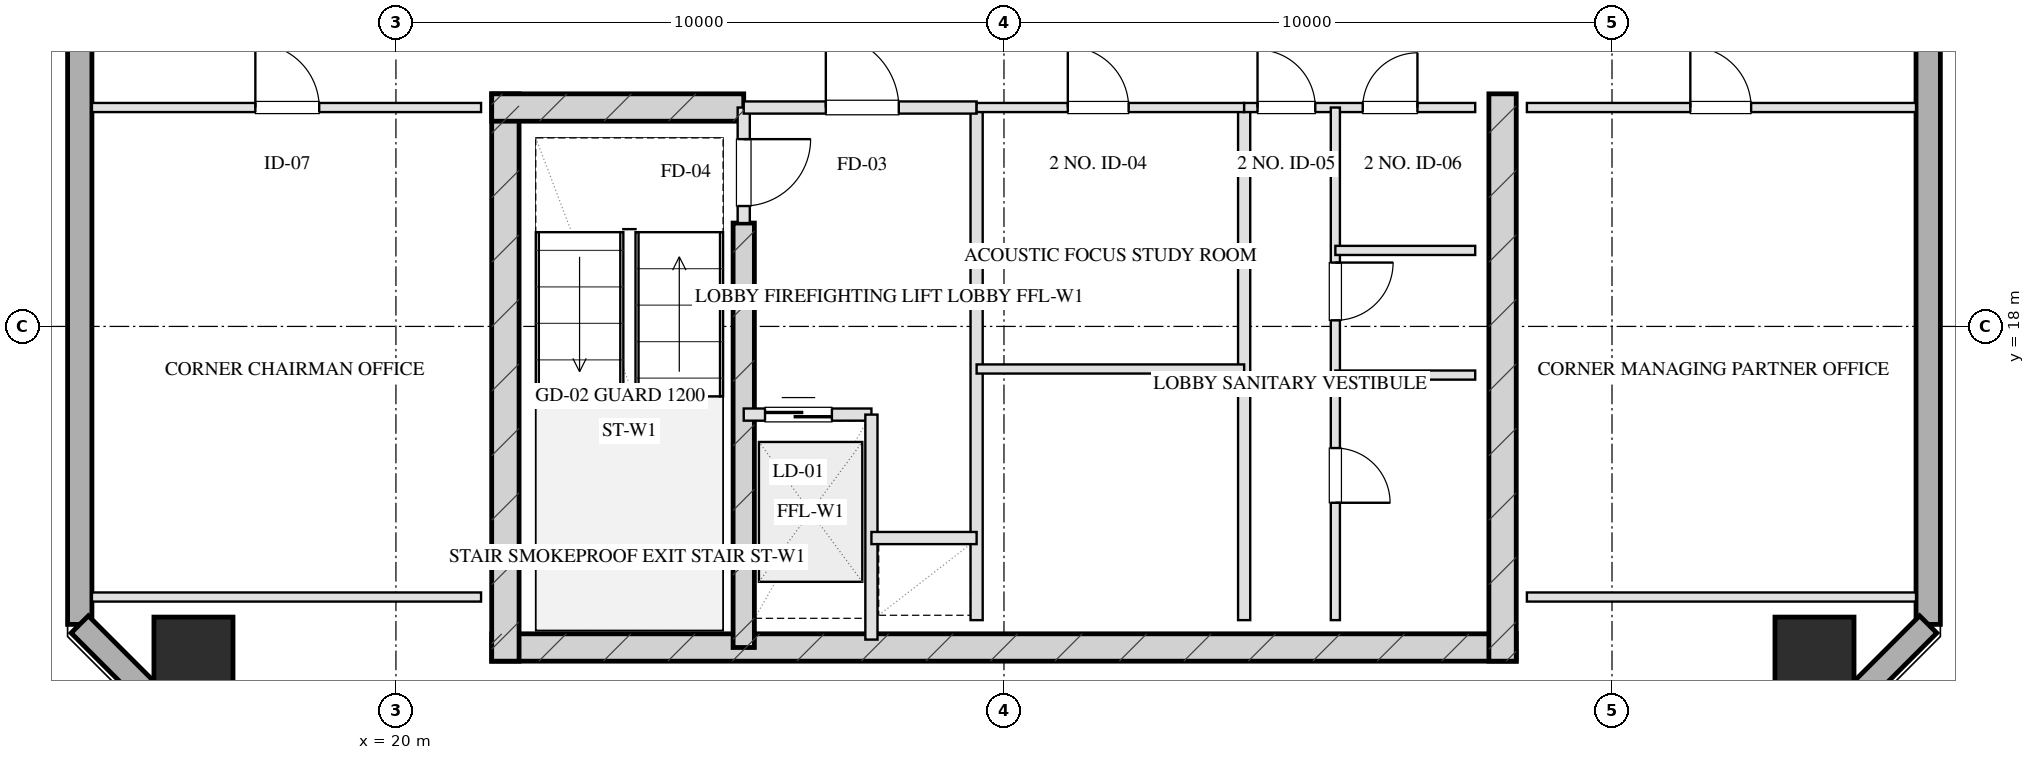
"""IFC4 building model, lengths in metres.
Left out: names, types, materials, properties, quantities, classifications, styles, units other than length and angle.
Written with IfcOpenShell. Run it as: python <this file> out.ifc"""

import sys

from ifc_helpers import new_model, si_unit, direction, frame, frame_2d, origin, origin_2d, place, context, subcontext, project, spatial, rectangle, hollow_rectangle, extrude, element, fill, save


model = new_model("IFC4")
c1 = context("Model", 3, precision=1e-05, world=origin(), true_north=direction((0.0, 1.0)))
c2 = subcontext(c1, "Body", "Model", "MODEL_VIEW")
j1 = project(units=[si_unit("LENGTHUNIT", "METRE"), si_unit("PLANEANGLEUNIT", "RADIAN")], contexts=[c1])
p1 = place(None, origin())
s1 = spatial("IfcSite", under=j1, at=p1, CompositionType="ELEMENT")
p2 = place(p1, origin())
s2 = spatial("IfcBuilding", under=s1, at=p2, CompositionType="ELEMENT")
p3 = place(p2, frame((0.0, 0.0, 253.6)))
s3 = spatial("IfcBuildingStorey", under=s2, at=p3, CompositionType="ELEMENT", Elevation=253.6)
p4 = place(p3, frame((21.575, 12.72, 0.0), z_axis=(0.0, 0.0, 1.0), x_axis=(1.0, 0.0, 0.0)))
e1 = element("IfcWall", 1, at=p4, inside=s3, PredefinedType="SHEAR", context=c2, shape_type="SweptSolid", body=[
    extrude(rectangle(XDim=16.85, YDim=0.45, at=frame_2d((8.425, 0.0))), origin(), (0.0, 0.0, 1.0), 3.2),
])
for number, where, z_axis, x_axis in (
    (2, (21.8, 21.825, 0.0), (0.0, 0.0, 1.0), (0.0, -1.0, 0.0)),
    (3, (38.2, 21.825, 0.0), (0.0, 0.0, 1.0), (0.0, -1.0, 0.0)),
):
    element("IfcWall", number, at=place(p3, frame(where, z_axis=z_axis, x_axis=x_axis)), inside=s3, PredefinedType="SHEAR", context=c2, shape_type="SweptSolid", body=[
        extrude(rectangle(XDim=9.33, YDim=0.45, at=frame_2d((4.665, 0.0))), origin(), (0.0, 0.0, 1.0), 3.2),
    ])
p5 = place(p3, frame((25.72, 19.7, 0.0), z_axis=(0.0, 0.0, 1.0), x_axis=(0.0, -1.0, 0.0)))
e4 = element("IfcWall", 4, at=p5, inside=s3, PredefinedType="SHEAR", context=c2, shape_type="SweptSolid", body=[
    extrude(rectangle(XDim=6.98, YDim=0.35, at=frame_2d((3.49, 0.0))), origin(), (0.0, 0.0, 1.0), 3.2),
])
p6 = place(p3, frame((21.575, 21.6, 0.0), z_axis=(0.0, 0.0, 1.0), x_axis=(1.0, 0.0, 0.0)))
e5 = element("IfcWall", 5, at=p6, inside=s3, PredefinedType="SHEAR", context=c2, shape_type="SweptSolid", body=[
    extrude(rectangle(XDim=4.145, YDim=0.45, at=frame_2d((2.073, 0.0))), origin(), (0.0, 0.0, 1.0), 3.2),
])
for number, where, z_axis, x_axis in (
    (6, (16.67, 12.57, 0.0), (0.0, 0.0, 1.0), (1.0, 0.0, 0.0)),
    (7, (43.33, 12.57, 0.0), (0.0, 0.0, 1.0), (1.0, 0.0, 0.0)),
):
    element("IfcColumn", number, at=place(p3, frame(where, z_axis=z_axis, x_axis=x_axis)), inside=s3, PredefinedType="COLUMN", context=c2, shape_type="SweptSolid", body=[
        extrude(hollow_rectangle(XDim=1.3, YDim=1.3, WallThickness=0.045, at=origin_2d()), origin(), (0.0, 0.0, 1.0), 3.201),
    ])
p7 = place(p3, frame((14.8, 13.1, 0.0), z_axis=(0.0, 0.0, 1.0), x_axis=(0.0, 1.0, 0.0)))
e8 = element("IfcWall", 8, at=p7, inside=s3, PredefinedType="SOLIDWALL", context=c2, shape_type="SweptSolid", body=[
    extrude(rectangle(XDim=41.8, YDim=0.4, at=frame_2d((20.9, 0.0))), origin(), (0.0, 0.0, 1.0), 2.36),
])
p8 = place(p7, frame((13.525, 0.0, 0.75)))
e9 = element("IfcOpeningElement", 9, at=p8, cuts=e8, PredefinedType="OPENING", context=c2, shape_type="SweptSolid", body=[
    extrude(rectangle(XDim=1.95, YDim=1.21, at=frame_2d((0.975, 0.605))), frame((0.0, 0.21, 0.0), z_axis=(0.0, -1.0, 0.0), x_axis=(1.0, 0.0, 0.0)), (0.0, 0.0, 1.0), 0.42),
])
p9 = place(p7, frame((17.325, 0.0, 0.75)))
e10 = element("IfcOpeningElement", 10, at=p9, cuts=e8, PredefinedType="OPENING", context=c2, shape_type="SweptSolid", body=[
    extrude(rectangle(XDim=1.95, YDim=1.21, at=frame_2d((0.975, 0.605))), frame((0.0, 0.21, 0.0), z_axis=(0.0, -1.0, 0.0), x_axis=(1.0, 0.0, 0.0)), (0.0, 0.0, 1.0), 0.42),
])
p10 = place(p7, frame((22.525, 0.0, 0.75)))
e11 = element("IfcOpeningElement", 11, at=p10, cuts=e8, PredefinedType="OPENING", context=c2, shape_type="SweptSolid", body=[
    extrude(rectangle(XDim=1.95, YDim=1.21, at=frame_2d((0.975, 0.605))), frame((0.0, 0.21, 0.0), z_axis=(0.0, -1.0, 0.0), x_axis=(1.0, 0.0, 0.0)), (0.0, 0.0, 1.0), 0.42),
])
p11 = place(p7, frame((26.325, 0.0, 0.75)))
e12 = element("IfcOpeningElement", 12, at=p11, cuts=e8, PredefinedType="OPENING", context=c2, shape_type="SweptSolid", body=[
    extrude(rectangle(XDim=1.95, YDim=1.21, at=frame_2d((0.975, 0.605))), frame((0.0, 0.21, 0.0), z_axis=(0.0, -1.0, 0.0), x_axis=(1.0, 0.0, 0.0)), (0.0, 0.0, 1.0), 0.42),
])
p12 = place(p3, frame((45.2, 54.9, 0.0), z_axis=(0.0, 0.0, 1.0), x_axis=(0.0, -1.0, 0.0)))
e13 = element("IfcWall", 13, at=p12, inside=s3, PredefinedType="SOLIDWALL", context=c2, shape_type="SweptSolid", body=[
    extrude(rectangle(XDim=41.8, YDim=0.4, at=frame_2d((20.9, 0.0))), origin(), (0.0, 0.0, 1.0), 2.36),
])
p13 = place(p12, frame((26.325, 0.0, 0.75)))
e14 = element("IfcOpeningElement", 14, at=p13, cuts=e13, PredefinedType="OPENING", context=c2, shape_type="SweptSolid", body=[
    extrude(rectangle(XDim=1.95, YDim=1.21, at=frame_2d((0.975, 0.605))), frame((0.0, 0.21, 0.0), z_axis=(0.0, -1.0, 0.0), x_axis=(1.0, 0.0, 0.0)), (0.0, 0.0, 1.0), 0.42),
])
p14 = place(p12, frame((22.525, 0.0, 0.75)))
e15 = element("IfcOpeningElement", 15, at=p14, cuts=e13, PredefinedType="OPENING", context=c2, shape_type="SweptSolid", body=[
    extrude(rectangle(XDim=1.95, YDim=1.21, at=frame_2d((0.975, 0.605))), frame((0.0, 0.21, 0.0), z_axis=(0.0, -1.0, 0.0), x_axis=(1.0, 0.0, 0.0)), (0.0, 0.0, 1.0), 0.42),
])
p15 = place(p12, frame((17.325, 0.0, 0.75)))
e16 = element("IfcOpeningElement", 16, at=p15, cuts=e13, PredefinedType="OPENING", context=c2, shape_type="SweptSolid", body=[
    extrude(rectangle(XDim=1.95, YDim=1.21, at=frame_2d((0.975, 0.605))), frame((0.0, 0.21, 0.0), z_axis=(0.0, -1.0, 0.0), x_axis=(1.0, 0.0, 0.0)), (0.0, 0.0, 1.0), 0.42),
])
p16 = place(p12, frame((13.525, 0.0, 0.75)))
e17 = element("IfcOpeningElement", 17, at=p16, cuts=e13, PredefinedType="OPENING", context=c2, shape_type="SweptSolid", body=[
    extrude(rectangle(XDim=1.95, YDim=1.21, at=frame_2d((0.975, 0.605))), frame((0.0, 0.21, 0.0), z_axis=(0.0, -1.0, 0.0), x_axis=(1.0, 0.0, 0.0)), (0.0, 0.0, 1.0), 0.42),
])
for number, where, z_axis, x_axis in (
    (18, (45.2, 13.1, 0.0), (0.0, 0.0, 1.0), (-0.707, -0.707, 0.0)),
    (19, (17.2, 10.7, 0.0), (0.0, 0.0, 1.0), (-0.707, 0.707, 0.0)),
):
    element("IfcWall", number, at=place(p3, frame(where, z_axis=z_axis, x_axis=x_axis)), inside=s3, PredefinedType="SOLIDWALL", context=c2, shape_type="SweptSolid", body=[
        extrude(rectangle(XDim=3.394, YDim=0.4, at=frame_2d((1.697, 0.0))), origin(), (0.0, 0.0, 1.0), 2.36),
    ])
p17 = place(p3, frame((25.72, 21.6, 0.0), z_axis=(0.0, 0.0, 1.0), x_axis=(0.0, -1.0, 0.0)))
e20 = element("IfcWall", 20, at=p17, inside=s3, PredefinedType="PARTITIONING", context=c2, shape_type="SweptSolid", body=[
    extrude(rectangle(XDim=1.9, YDim=0.2, at=frame_2d((0.95, 0.0))), origin(), (0.0, 0.0, 1.0), 2.925),
])
p18 = place(p17, frame((0.52, 0.0, 0.0)))
e21 = element("IfcOpeningElement", 21, at=p18, cuts=e20, PredefinedType="OPENING", context=c2, shape_type="SweptSolid", body=[
    extrude(rectangle(XDim=1.1, YDim=2.05, at=frame_2d((0.55, 1.025))), frame((0.0, 0.11, 0.0), z_axis=(0.0, -1.0, 0.0), x_axis=(1.0, 0.0, 0.0)), (0.0, 0.0, 1.0), 0.22),
])
p19 = place(p3, frame((29.55, 21.6, 0.0), z_axis=(0.0, 0.0, 1.0), x_axis=(0.0, -1.0, 0.0)))
e22 = element("IfcWall", 22, at=p19, inside=s3, PredefinedType="PARTITIONING", context=c2, shape_type="SweptSolid", body=[
    extrude(rectangle(XDim=8.43, YDim=0.2, at=frame_2d((4.215, 0.0))), origin(), (0.0, 0.0, 1.0), 2.925),
])
p20 = place(p3, frame((25.72, 21.6, 0.0), z_axis=(0.0, 0.0, 1.0), x_axis=(1.0, 0.0, 0.0)))
e23 = element("IfcWall", 23, at=p20, inside=s3, PredefinedType="PARTITIONING", context=c2, shape_type="SweptSolid", body=[
    extrude(rectangle(XDim=3.83, YDim=0.2, at=frame_2d((1.915, 0.0))), origin(), (0.0, 0.0, 1.0), 2.925),
])
p21 = place(p20, frame((1.35, 0.0, 0.0)))
e24 = element("IfcOpeningElement", 24, at=p21, cuts=e23, PredefinedType="OPENING", context=c2, shape_type="SweptSolid", body=[
    extrude(rectangle(XDim=1.2, YDim=2.05, at=frame_2d((0.6, 1.025))), frame((0.0, 0.11, 0.0), z_axis=(0.0, -1.0, 0.0), x_axis=(1.0, 0.0, 0.0)), (0.0, 0.0, 1.0), 0.22),
])
p22 = place(p3, frame((25.72, 16.55, 0.0), z_axis=(0.0, 0.0, 1.0), x_axis=(1.0, 0.0, 0.0)))
e25 = element("IfcWall", 25, at=p22, inside=s3, PredefinedType="PARTITIONING", context=c2, shape_type="SweptSolid", body=[
    extrude(rectangle(XDim=2.1, YDim=0.2, at=frame_2d((1.05, 0.0))), origin(), (0.0, 0.0, 1.0), 2.925),
])
p23 = place(p22, frame((0.35, 0.0, 0.0)))
e26 = element("IfcOpeningElement", 26, at=p23, cuts=e25, PredefinedType="OPENING", context=c2, shape_type="SweptSolid", body=[
    extrude(rectangle(XDim=1.1, YDim=2.05, at=frame_2d((0.55, 1.025))), frame((0.0, 0.11, 0.0), z_axis=(0.0, -1.0, 0.0), x_axis=(1.0, 0.0, 0.0)), (0.0, 0.0, 1.0), 0.22),
])
p24 = place(p3, frame((27.82, 16.55, 0.0), z_axis=(0.0, 0.0, 1.0), x_axis=(0.0, -1.0, 0.0)))
e27 = element("IfcWall", 27, at=p24, inside=s3, PredefinedType="PARTITIONING", context=c2, shape_type="SweptSolid", body=[
    extrude(rectangle(XDim=3.7, YDim=0.2, at=frame_2d((1.85, 0.0))), origin(), (0.0, 0.0, 1.0), 2.925),
])
p25 = place(p3, frame((27.82, 14.52, 0.0), z_axis=(0.0, 0.0, 1.0), x_axis=(1.0, 0.0, 0.0)))
e28 = element("IfcWall", 28, at=p25, inside=s3, PredefinedType="PARTITIONING", context=c2, shape_type="SweptSolid", body=[
    extrude(rectangle(XDim=1.73, YDim=0.2, at=frame_2d((0.865, 0.0))), origin(), (0.0, 0.0, 1.0), 2.925),
])
p26 = place(p3, frame((33.95, 21.6, 0.0), z_axis=(0.0, 0.0, 1.0), x_axis=(0.0, -1.0, 0.0)))
e29 = element("IfcWall", 29, at=p26, inside=s3, PredefinedType="PARTITIONING", context=c2, shape_type="SweptSolid", body=[
    extrude(rectangle(XDim=8.43, YDim=0.2, at=frame_2d((4.215, 0.0))), origin(), (0.0, 0.0, 1.0), 2.925),
])
p27 = place(p3, frame((29.55, 21.6, 0.0), z_axis=(0.0, 0.0, 1.0), x_axis=(1.0, 0.0, 0.0)))
e30 = element("IfcWall", 30, at=p27, inside=s3, PredefinedType="PARTITIONING", context=c2, shape_type="SweptSolid", body=[
    extrude(rectangle(XDim=4.4, YDim=0.15, at=frame_2d((2.2, 0.0))), origin(), (0.0, 0.0, 1.0), 2.925),
])
p28 = place(p27, frame((1.5, 0.0, 0.0)))
e31 = element("IfcOpeningElement", 31, at=p28, cuts=e30, PredefinedType="OPENING", context=c2, shape_type="SweptSolid", body=[
    extrude(rectangle(XDim=1.0, YDim=2.05, at=frame_2d((0.5, 1.025))), frame((0.0, 0.085, 0.0), z_axis=(0.0, -1.0, 0.0), x_axis=(1.0, 0.0, 0.0)), (0.0, 0.0, 1.0), 0.17),
])
p29 = place(p3, frame((29.55, 17.3, 0.0), z_axis=(0.0, 0.0, 1.0), x_axis=(1.0, 0.0, 0.0)))
e32 = element("IfcWall", 32, at=p29, inside=s3, PredefinedType="PARTITIONING", context=c2, shape_type="SweptSolid", body=[
    extrude(rectangle(XDim=4.4, YDim=0.15, at=frame_2d((2.2, 0.0))), origin(), (0.0, 0.0, 1.0), 2.925),
])
p30 = place(p3, frame((33.95, 21.6, 0.0), z_axis=(0.0, 0.0, 1.0), x_axis=(1.0, 0.0, 0.0)))
e33 = element("IfcWall", 33, at=p30, inside=s3, PredefinedType="PARTITIONING", context=c2, shape_type="SweptSolid", body=[
    extrude(rectangle(XDim=3.8, YDim=0.15, at=frame_2d((1.9, 0.0))), origin(), (0.0, 0.0, 1.0), 2.925),
])
p31 = place(p30, frame((0.22, 0.0, 0.0)))
e34 = element("IfcOpeningElement", 34, at=p31, cuts=e33, PredefinedType="OPENING", context=c2, shape_type="SweptSolid", body=[
    extrude(rectangle(XDim=0.95, YDim=2.05, at=frame_2d((0.475, 1.025))), frame((0.0, 0.085, 0.0), z_axis=(0.0, -1.0, 0.0), x_axis=(1.0, 0.0, 0.0)), (0.0, 0.0, 1.0), 0.17),
])
p32 = place(p30, frame((1.95, 0.0, 0.0)))
e35 = element("IfcOpeningElement", 35, at=p32, cuts=e33, PredefinedType="OPENING", context=c2, shape_type="SweptSolid", body=[
    extrude(rectangle(XDim=0.9, YDim=2.05, at=frame_2d((0.45, 1.025))), frame((0.0, 0.085, 0.0), z_axis=(0.0, -1.0, 0.0), x_axis=(1.0, 0.0, 0.0)), (0.0, 0.0, 1.0), 0.17),
])
p33 = place(p3, frame((35.45, 21.6, 0.0), z_axis=(0.0, 0.0, 1.0), x_axis=(0.0, -1.0, 0.0)))
e36 = element("IfcWall", 36, at=p33, inside=s3, PredefinedType="PARTITIONING", context=c2, shape_type="SweptSolid", body=[
    extrude(rectangle(XDim=8.43, YDim=0.15, at=frame_2d((4.215, 0.0))), origin(), (0.0, 0.0, 1.0), 2.565),
])
p34 = place(p33, frame((2.55, 0.0, 0.0)))
e37 = element("IfcOpeningElement", 37, at=p34, cuts=e36, PredefinedType="OPENING", context=c2, shape_type="SweptSolid", body=[
    extrude(rectangle(XDim=0.95, YDim=2.05, at=frame_2d((0.475, 1.025))), frame((0.0, 0.085, 0.0), z_axis=(0.0, -1.0, 0.0), x_axis=(1.0, 0.0, 0.0)), (0.0, 0.0, 1.0), 0.17),
])
p35 = place(p33, frame((5.6, 0.0, 0.0)))
e38 = element("IfcOpeningElement", 38, at=p35, cuts=e36, PredefinedType="OPENING", context=c2, shape_type="SweptSolid", body=[
    extrude(rectangle(XDim=0.9, YDim=2.05, at=frame_2d((0.45, 1.025))), frame((0.0, 0.085, 0.0), z_axis=(0.0, -1.0, 0.0), x_axis=(1.0, 0.0, 0.0)), (0.0, 0.0, 1.0), 0.17),
])
for number, where, z_axis, x_axis in (
    (39, (35.45, 17.2, 0.0), (0.0, 0.0, 1.0), (1.0, 0.0, 0.0)),
    (40, (35.45, 19.25, 0.0), (0.0, 0.0, 1.0), (1.0, 0.0, 0.0)),
):
    element("IfcWall", number, at=place(p3, frame(where, z_axis=z_axis, x_axis=x_axis)), inside=s3, PredefinedType="PARTITIONING", context=c2, shape_type="SweptSolid", body=[
        extrude(rectangle(XDim=2.3, YDim=0.15, at=frame_2d((1.15, 0.0))), origin(), (0.0, 0.0, 1.0), 2.925),
    ])
p36 = place(p3, frame((15.0, 13.55, 0.0), z_axis=(0.0, 0.0, 1.0), x_axis=(1.0, 0.0, 0.0)))
e41 = element("IfcWall", 41, at=p36, inside=s3, PredefinedType="PARTITIONING", context=c2, shape_type="SweptSolid", body=[
    extrude(rectangle(XDim=6.4, YDim=0.15, at=frame_2d((3.2, 0.0))), origin(), (0.0, 0.0, 1.0), 2.925),
])
p37 = place(p3, frame((15.0, 21.6, 0.0), z_axis=(0.0, 0.0, 1.0), x_axis=(1.0, 0.0, 0.0)))
e42 = element("IfcWall", 42, at=p37, inside=s3, PredefinedType="PARTITIONING", context=c2, shape_type="SweptSolid", body=[
    extrude(rectangle(XDim=6.4, YDim=0.15, at=frame_2d((3.2, 0.0))), origin(), (0.0, 0.0, 1.0), 2.925),
])
p38 = place(p37, frame((2.688, 0.0, 0.0)))
e43 = element("IfcOpeningElement", 43, at=p38, cuts=e42, PredefinedType="OPENING", context=c2, shape_type="SweptSolid", body=[
    extrude(rectangle(XDim=1.05, YDim=2.05, at=frame_2d((0.525, 1.025))), frame((0.0, 0.085, 0.0), z_axis=(0.0, -1.0, 0.0), x_axis=(1.0, 0.0, 0.0)), (0.0, 0.0, 1.0), 0.17),
])
p39 = place(p3, frame((38.6, 13.55, 0.0), z_axis=(0.0, 0.0, 1.0), x_axis=(1.0, 0.0, 0.0)))
e44 = element("IfcWall", 44, at=p39, inside=s3, PredefinedType="PARTITIONING", context=c2, shape_type="SweptSolid", body=[
    extrude(rectangle(XDim=6.4, YDim=0.15, at=frame_2d((3.2, 0.0))), origin(), (0.0, 0.0, 1.0), 2.925),
])
p40 = place(p3, frame((38.6, 21.6, 0.0), z_axis=(0.0, 0.0, 1.0), x_axis=(1.0, 0.0, 0.0)))
e45 = element("IfcWall", 45, at=p40, inside=s3, PredefinedType="PARTITIONING", context=c2, shape_type="SweptSolid", body=[
    extrude(rectangle(XDim=6.4, YDim=0.15, at=frame_2d((3.2, 0.0))), origin(), (0.0, 0.0, 1.0), 2.925),
])
p41 = place(p40, frame((2.688, 0.0, 0.0)))
e46 = element("IfcOpeningElement", 46, at=p41, cuts=e45, PredefinedType="OPENING", context=c2, shape_type="SweptSolid", body=[
    extrude(rectangle(XDim=1.0, YDim=2.05, at=frame_2d((0.5, 1.025))), frame((0.0, 0.085, 0.0), z_axis=(0.0, -1.0, 0.0), x_axis=(1.0, 0.0, 0.0)), (0.0, 0.0, 1.0), 0.17),
])
p42 = place(p18, origin())
e47 = element("IfcDoor", 47, at=p42, inside=s3, OperationType="SINGLE_SWING_LEFT", PredefinedType="DOOR", context=c2, shape_type="SweptSolid", body=[
    extrude(rectangle(XDim=1.1, YDim=2.05, at=frame_2d((0.55, 1.025))), frame((0.0, 0.025, 0.0), z_axis=(0.0, -1.0, 0.0), x_axis=(1.0, 0.0, 0.0)), (0.0, 0.0, 1.0), 0.05),
])
fill(e21, e47)
p43 = place(p21, origin())
e48 = element("IfcDoor", 48, at=p43, inside=s3, OperationType="SINGLE_SWING_LEFT", PredefinedType="DOOR", context=c2, shape_type="SweptSolid", body=[
    extrude(rectangle(XDim=1.2, YDim=2.05, at=frame_2d((0.6, 1.025))), frame((0.0, 0.025, 0.0), z_axis=(0.0, -1.0, 0.0), x_axis=(1.0, 0.0, 0.0)), (0.0, 0.0, 1.0), 0.05),
])
fill(e24, e48)
p44 = place(p23, origin())
e49 = element("IfcDoor", 49, at=p44, inside=s3, OperationType="DOUBLE_DOOR_SLIDING", PredefinedType="DOOR", context=c2, shape_type="SweptSolid", body=[
    extrude(rectangle(XDim=1.1, YDim=2.05, at=frame_2d((0.55, 1.025))), frame((0.0, 0.025, 0.0), z_axis=(0.0, -1.0, 0.0), x_axis=(1.0, 0.0, 0.0)), (0.0, 0.0, 1.0), 0.05),
])
fill(e26, e49)
p45 = place(p28, origin())
e50 = element("IfcDoor", 50, at=p45, inside=s3, OperationType="SINGLE_SWING_LEFT", PredefinedType="DOOR", context=c2, shape_type="SweptSolid", body=[
    extrude(rectangle(XDim=1.0, YDim=2.05, at=frame_2d((0.5, 1.025))), frame((0.0, 0.025, 0.0), z_axis=(0.0, -1.0, 0.0), x_axis=(1.0, 0.0, 0.0)), (0.0, 0.0, 1.0), 0.05),
])
fill(e31, e50)
p46 = place(p31, origin())
e51 = element("IfcDoor", 51, at=p46, inside=s3, OperationType="SINGLE_SWING_LEFT", PredefinedType="DOOR", context=c2, shape_type="SweptSolid", body=[
    extrude(rectangle(XDim=0.95, YDim=2.05, at=frame_2d((0.475, 1.025))), frame((0.0, 0.025, 0.0), z_axis=(0.0, -1.0, 0.0), x_axis=(1.0, 0.0, 0.0)), (0.0, 0.0, 1.0), 0.05),
])
fill(e34, e51)
p47 = place(p32, origin())
e52 = element("IfcDoor", 52, at=p47, inside=s3, OperationType="SINGLE_SWING_RIGHT", PredefinedType="DOOR", context=c2, shape_type="SweptSolid", body=[
    extrude(rectangle(XDim=0.9, YDim=2.05, at=frame_2d((0.45, 1.025))), frame((0.0, 0.025, 0.0), z_axis=(0.0, -1.0, 0.0), x_axis=(1.0, 0.0, 0.0)), (0.0, 0.0, 1.0), 0.05),
])
fill(e35, e52)
p48 = place(p34, origin())
e53 = element("IfcDoor", 53, at=p48, inside=s3, OperationType="SINGLE_SWING_LEFT", PredefinedType="DOOR", context=c2, shape_type="SweptSolid", body=[
    extrude(rectangle(XDim=0.95, YDim=2.05, at=frame_2d((0.475, 1.025))), frame((0.0, 0.025, 0.0), z_axis=(0.0, -1.0, 0.0), x_axis=(1.0, 0.0, 0.0)), (0.0, 0.0, 1.0), 0.05),
])
fill(e37, e53)
p49 = place(p35, origin())
e54 = element("IfcDoor", 54, at=p49, inside=s3, OperationType="SINGLE_SWING_RIGHT", PredefinedType="DOOR", context=c2, shape_type="SweptSolid", body=[
    extrude(rectangle(XDim=0.9, YDim=2.05, at=frame_2d((0.45, 1.025))), frame((0.0, 0.025, 0.0), z_axis=(0.0, -1.0, 0.0), x_axis=(1.0, 0.0, 0.0)), (0.0, 0.0, 1.0), 0.05),
])
fill(e38, e54)
p50 = place(p38, origin())
e55 = element("IfcDoor", 55, at=p50, inside=s3, OperationType="SINGLE_SWING_LEFT", PredefinedType="DOOR", context=c2, shape_type="SweptSolid", body=[
    extrude(rectangle(XDim=1.05, YDim=2.05, at=frame_2d((0.525, 1.025))), frame((0.0, 0.025, 0.0), z_axis=(0.0, -1.0, 0.0), x_axis=(1.0, 0.0, 0.0)), (0.0, 0.0, 1.0), 0.05),
])
fill(e43, e55)
p51 = place(p41, origin())
e56 = element("IfcDoor", 56, at=p51, inside=s3, OperationType="SINGLE_SWING_LEFT", PredefinedType="DOOR", context=c2, shape_type="SweptSolid", body=[
    extrude(rectangle(XDim=1.0, YDim=2.05, at=frame_2d((0.5, 1.025))), frame((0.0, 0.025, 0.0), z_axis=(0.0, -1.0, 0.0), x_axis=(1.0, 0.0, 0.0)), (0.0, 0.0, 1.0), 0.05),
])
fill(e46, e56)
save(model, sys.argv[1])
